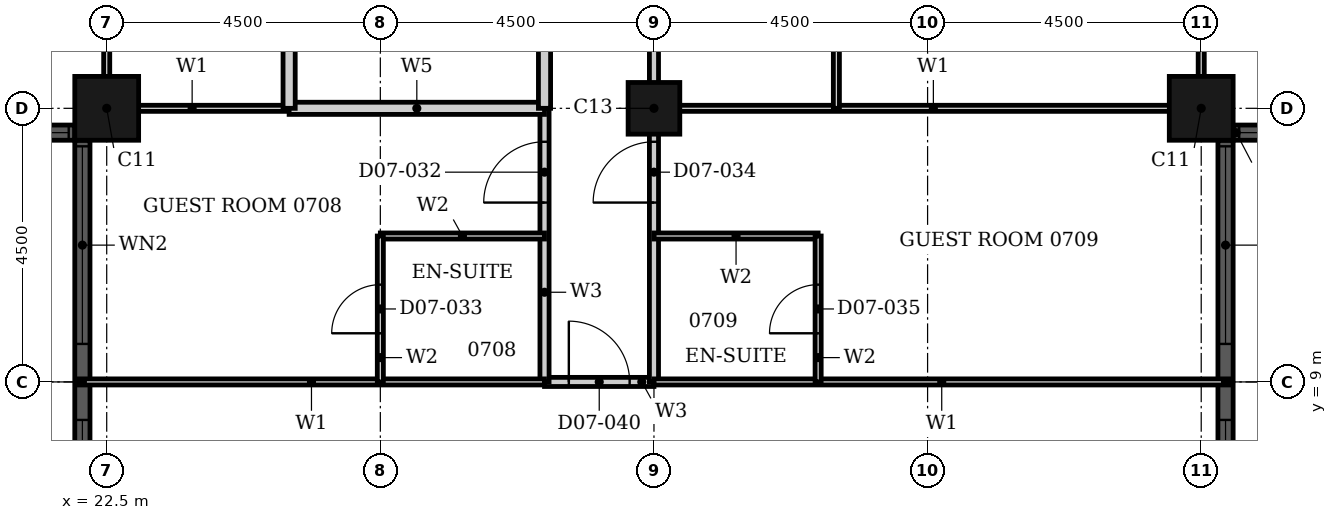
"""IFC4 building model, lengths in metres.
Left out: names, types, materials, properties, quantities, classifications, styles, units other than length and angle.
Written with IfcOpenShell. Run it as: python <this file> out.ifc"""

import sys

from ifc_helpers import new_model, si_unit, direction, frame, frame_2d, origin, origin_2d, place, context, subcontext, project, spatial, rectangle, hollow_rectangle, extrude, element, fill, save


model = new_model("IFC4")
c1 = context("Model", 3, precision=1e-05, world=origin(), true_north=direction((0.0, 1.0)))
c2 = subcontext(c1, "Body", "Model", "MODEL_VIEW")
j1 = project(units=[si_unit("LENGTHUNIT", "METRE"), si_unit("PLANEANGLEUNIT", "RADIAN")], contexts=[c1])
p1 = place(None, origin())
s1 = spatial("IfcSite", under=j1, at=p1, CompositionType="ELEMENT")
p2 = place(p1, origin())
s2 = spatial("IfcBuilding", under=s1, at=p2, CompositionType="ELEMENT")
p3 = place(p2, frame((0.0, 0.0, 37.2)))
s3 = spatial("IfcBuildingStorey", under=s2, at=p3, CompositionType="ELEMENT", Elevation=37.2)
for number, where, z_axis, x_axis in (
    (1, (40.5, 13.5, 0.0), (0.0, 0.0, 1.0), (1.0, 0.0, 0.0)),
    (2, (22.5, 13.5, 0.0), (0.0, 0.0, 1.0), (1.0, 0.0, 0.0)),
):
    element("IfcColumn", number, at=place(p3, frame(where, z_axis=z_axis, x_axis=x_axis)), inside=s3, PredefinedType="COLUMN", context=c2, shape_type="SweptSolid", body=[
        extrude(hollow_rectangle(XDim=1.05, YDim=1.05, WallThickness=0.034, at=origin_2d()), origin(), (0.0, 0.0, 1.0), 3.6),
    ])
p4 = place(p3, frame((31.5, 13.5, 0.0), z_axis=(0.0, 0.0, 1.0), x_axis=(1.0, 0.0, 0.0)))
e3 = element("IfcColumn", 3, at=p4, inside=s3, PredefinedType="COLUMN", context=c2, shape_type="SweptSolid", body=[
    extrude(hollow_rectangle(XDim=0.85, YDim=0.85, WallThickness=0.026, at=origin_2d()), origin(), (0.0, 0.0, 1.0), 3.6),
])
p5 = place(p3, frame((40.9, 5.025, 0.0), z_axis=(0.0, 0.0, 1.0), x_axis=(0.0, 1.0, 0.0)))
e4 = element("IfcWall", 4, at=p5, inside=s3, PredefinedType="SOLIDWALL", context=c2, shape_type="SweptSolid", body=[
    extrude(rectangle(XDim=7.95, YDim=0.25, at=frame_2d((3.975, 0.0))), origin(), (0.0, 0.0, 1.0), 3.6),
])
p6 = place(p5, frame((0.1, 0.0, 0.9)))
e5 = element("IfcOpeningElement", 5, at=p6, cuts=e4, PredefinedType="OPENING", context=c2, shape_type="SweptSolid", body=[
    extrude(rectangle(XDim=3.25, YDim=2.08, at=frame_2d((1.625, 1.04))), frame((0.0, 0.135, 0.0), z_axis=(0.0, -1.0, 0.0), x_axis=(1.0, 0.0, 0.0)), (0.0, 0.0, 1.0), 0.27),
])
p7 = place(p5, frame((4.6, 0.0, 0.9)))
e6 = element("IfcOpeningElement", 6, at=p7, cuts=e4, PredefinedType="OPENING", context=c2, shape_type="SweptSolid", body=[
    extrude(rectangle(XDim=3.25, YDim=2.08, at=frame_2d((1.625, 1.04))), frame((0.0, 0.135, 0.0), z_axis=(0.0, -1.0, 0.0), x_axis=(1.0, 0.0, 0.0)), (0.0, 0.0, 1.0), 0.27),
])
p8 = place(p3, frame((41.025, 13.1, 0.0), z_axis=(0.0, 0.0, 1.0), x_axis=(1.0, 0.0, 0.0)))
e7 = element("IfcWall", 7, at=p8, inside=s3, PredefinedType="SOLIDWALL", context=c2, shape_type="SweptSolid", body=[
    extrude(rectangle(XDim=3.45, YDim=0.25, at=frame_2d((1.725, 0.0))), origin(), (0.0, 0.0, 1.0), 3.6),
])
p9 = place(p8, frame((0.1, 0.0, 0.9)))
e8 = element("IfcOpeningElement", 8, at=p9, cuts=e7, PredefinedType="OPENING", context=c2, shape_type="SweptSolid", body=[
    extrude(rectangle(XDim=3.25, YDim=2.08, at=frame_2d((1.625, 1.04))), frame((0.0, 0.135, 0.0), z_axis=(0.0, -1.0, 0.0), x_axis=(1.0, 0.0, 0.0)), (0.0, 0.0, 1.0), 0.27),
])
p10 = place(p3, frame((18.525, 13.1, 0.0), z_axis=(0.0, 0.0, 1.0), x_axis=(1.0, 0.0, 0.0)))
e9 = element("IfcWall", 9, at=p10, inside=s3, PredefinedType="SOLIDWALL", context=c2, shape_type="SweptSolid", body=[
    extrude(rectangle(XDim=3.45, YDim=0.25, at=frame_2d((1.725, 0.0))), origin(), (0.0, 0.0, 1.0), 3.6),
])
p11 = place(p10, frame((0.1, 0.0, 0.9)))
e10 = element("IfcOpeningElement", 10, at=p11, cuts=e9, PredefinedType="OPENING", context=c2, shape_type="SweptSolid", body=[
    extrude(rectangle(XDim=3.25, YDim=2.08, at=frame_2d((1.625, 1.04))), frame((0.0, 0.135, 0.0), z_axis=(0.0, -1.0, 0.0), x_axis=(1.0, 0.0, 0.0)), (0.0, 0.0, 1.0), 0.27),
])
p12 = place(p3, frame((22.1, 12.975, 0.0), z_axis=(0.0, 0.0, 1.0), x_axis=(0.0, -1.0, 0.0)))
e11 = element("IfcWall", 11, at=p12, inside=s3, PredefinedType="SOLIDWALL", context=c2, shape_type="SweptSolid", body=[
    extrude(rectangle(XDim=7.95, YDim=0.25, at=frame_2d((3.975, 0.0))), origin(), (0.0, 0.0, 1.0), 3.6),
])
p13 = place(p12, frame((0.1, 0.0, 0.9)))
e12 = element("IfcOpeningElement", 12, at=p13, cuts=e11, PredefinedType="OPENING", context=c2, shape_type="SweptSolid", body=[
    extrude(rectangle(XDim=3.25, YDim=2.08, at=frame_2d((1.625, 1.04))), frame((0.0, 0.135, 0.0), z_axis=(0.0, -1.0, 0.0), x_axis=(1.0, 0.0, 0.0)), (0.0, 0.0, 1.0), 0.27),
])
p14 = place(p12, frame((4.6, 0.0, 0.9)))
e13 = element("IfcOpeningElement", 13, at=p14, cuts=e11, PredefinedType="OPENING", context=c2, shape_type="SweptSolid", body=[
    extrude(rectangle(XDim=3.25, YDim=2.08, at=frame_2d((1.625, 1.04))), frame((0.0, 0.135, 0.0), z_axis=(0.0, -1.0, 0.0), x_axis=(1.0, 0.0, 0.0)), (0.0, 0.0, 1.0), 0.27),
])
p15 = place(p3, frame((29.7, 9.0, 0.0), z_axis=(0.0, 0.0, 1.0), x_axis=(1.0, 0.0, 0.0)))
e14 = element("IfcWall", 14, at=p15, inside=s3, PredefinedType="PARTITIONING", context=c2, shape_type="SweptSolid", body=[
    extrude(rectangle(XDim=1.8, YDim=0.15, at=frame_2d((0.9, 0.0))), origin(), (0.0, 0.0, 1.0), 3.3),
])
p16 = place(p15, frame((0.4, 0.0, 0.0)))
e15 = element("IfcOpeningElement", 15, at=p16, cuts=e14, PredefinedType="OPENING", context=c2, shape_type="SweptSolid", body=[
    extrude(rectangle(XDim=1.0, YDim=2.1, at=frame_2d((0.5, 1.05))), frame((0.0, 0.085, 0.0), z_axis=(0.0, -1.0, 0.0), x_axis=(1.0, 0.0, 0.0)), (0.0, 0.0, 1.0), 0.17),
])
p17 = place(p3, frame((29.7, 9.0, 0.0), z_axis=(0.0, 0.0, 1.0), x_axis=(0.0, 1.0, 0.0)))
e16 = element("IfcWall", 16, at=p17, inside=s3, PredefinedType="PARTITIONING", context=c2, shape_type="SweptSolid", body=[
    extrude(rectangle(XDim=4.5, YDim=0.15, at=frame_2d((2.25, 0.0))), origin(), (0.0, 0.0, 1.0), 3.3),
])
p18 = place(p17, frame((2.95, 0.0, 0.0)))
e17 = element("IfcOpeningElement", 17, at=p18, cuts=e16, PredefinedType="OPENING", context=c2, shape_type="SweptSolid", body=[
    extrude(rectangle(XDim=1.0, YDim=2.1, at=frame_2d((0.5, 1.05))), frame((0.0, 0.085, 0.0), z_axis=(0.0, -1.0, 0.0), x_axis=(1.0, 0.0, 0.0)), (0.0, 0.0, 1.0), 0.17),
])
p19 = place(p3, frame((31.5, 9.0, 0.0), z_axis=(0.0, 0.0, 1.0), x_axis=(0.0, 1.0, 0.0)))
e18 = element("IfcWall", 18, at=p19, inside=s3, PredefinedType="PARTITIONING", context=c2, shape_type="SweptSolid", body=[
    extrude(rectangle(XDim=11.7, YDim=0.15, at=frame_2d((5.85, 0.0))), origin(), (0.0, 0.0, 1.0), 2.58),
])
p20 = place(p19, frame((2.95, 0.0, 0.0)))
e19 = element("IfcOpeningElement", 19, at=p20, cuts=e18, PredefinedType="OPENING", context=c2, shape_type="SweptSolid", body=[
    extrude(rectangle(XDim=1.0, YDim=2.1, at=frame_2d((0.5, 1.05))), frame((0.0, 0.085, 0.0), z_axis=(0.0, -1.0, 0.0), x_axis=(1.0, 0.0, 0.0)), (0.0, 0.0, 1.0), 0.17),
])
p21 = place(p3, frame((31.5, 13.5, 0.0), z_axis=(0.0, 0.0, 1.0), x_axis=(1.0, 0.0, 0.0)))
e20 = element("IfcWall", 20, at=p21, inside=s3, PredefinedType="PARTITIONING", context=c2, shape_type="SweptSolid", body=[
    extrude(rectangle(XDim=9.19, YDim=0.1, at=frame_2d((4.595, 0.0))), origin(), (0.0, 0.0, 1.0), 2.38),
])
p22 = place(p3, frame((22.31, 13.5, 0.0), z_axis=(0.0, 0.0, 1.0), x_axis=(1.0, 0.0, 0.0)))
e21 = element("IfcWall", 21, at=p22, inside=s3, PredefinedType="PARTITIONING", context=c2, shape_type="SweptSolid", body=[
    extrude(rectangle(XDim=3.19, YDim=0.1, at=frame_2d((1.595, 0.0))), origin(), (0.0, 0.0, 1.0), 2.38),
])
p23 = place(p3, frame((31.5, 9.0, 0.0), z_axis=(0.0, 0.0, 1.0), x_axis=(1.0, 0.0, 0.0)))
e22 = element("IfcWall", 22, at=p23, inside=s3, PredefinedType="PARTITIONING", context=c2, shape_type="SweptSolid", body=[
    extrude(rectangle(XDim=9.465, YDim=0.1, at=frame_2d((4.732, 0.0))), origin(), (0.0, 0.0, 1.0), 3.3),
])
p24 = place(p3, frame((22.035, 9.0, 0.0), z_axis=(0.0, 0.0, 1.0), x_axis=(1.0, 0.0, 0.0)))
e23 = element("IfcWall", 23, at=p24, inside=s3, PredefinedType="PARTITIONING", context=c2, shape_type="SweptSolid", body=[
    extrude(rectangle(XDim=7.665, YDim=0.1, at=frame_2d((3.833, 0.0))), origin(), (0.0, 0.0, 1.0), 3.3),
])
p25 = place(p3, frame((22.5, 13.31, 0.0), z_axis=(0.0, 0.0, 1.0), x_axis=(0.0, 1.0, 0.0)))
e24 = element("IfcWall", 24, at=p25, inside=s3, PredefinedType="PARTITIONING", context=c2, shape_type="SweptSolid", body=[
    extrude(rectangle(XDim=7.39, YDim=0.1, at=frame_2d((3.695, 0.0))), origin(), (0.0, 0.0, 1.0), 3.3),
])
p26 = place(p3, frame((34.5, 13.5, 0.0), z_axis=(0.0, 0.0, 1.0), x_axis=(0.0, 1.0, 0.0)))
e25 = element("IfcWall", 25, at=p26, inside=s3, PredefinedType="PARTITIONING", context=c2, shape_type="SweptSolid", body=[
    extrude(rectangle(XDim=7.2, YDim=0.1, at=frame_2d((3.6, 0.0))), origin(), (0.0, 0.0, 1.0), 3.3),
])
p27 = place(p3, frame((40.5, 13.31, 0.0), z_axis=(0.0, 0.0, 1.0), x_axis=(0.0, 1.0, 0.0)))
e26 = element("IfcWall", 26, at=p27, inside=s3, PredefinedType="PARTITIONING", context=c2, shape_type="SweptSolid", body=[
    extrude(rectangle(XDim=7.39, YDim=0.1, at=frame_2d((3.695, 0.0))), origin(), (0.0, 0.0, 1.0), 3.3),
])
for number, where, z_axis, x_axis in (
    (27, (31.5, 11.4, 0.0), (0.0, 0.0, 1.0), (1.0, 0.0, 0.0)),
    (28, (27.0, 11.4, 0.0), (0.0, 0.0, 1.0), (1.0, 0.0, 0.0)),
):
    element("IfcWall", number, at=place(p3, frame(where, z_axis=z_axis, x_axis=x_axis)), inside=s3, PredefinedType="PARTITIONING", context=c2, shape_type="SweptSolid", body=[
        extrude(rectangle(XDim=2.7, YDim=0.1, at=frame_2d((1.35, 0.0))), origin(), (0.0, 0.0, 1.0), 3.3),
    ])
p28 = place(p3, frame((27.0, 9.0, 0.0), z_axis=(0.0, 0.0, 1.0), x_axis=(0.0, 1.0, 0.0)))
e29 = element("IfcWall", 29, at=p28, inside=s3, PredefinedType="PARTITIONING", context=c2, shape_type="SweptSolid", body=[
    extrude(rectangle(XDim=2.4, YDim=0.1, at=frame_2d((1.2, 0.0))), origin(), (0.0, 0.0, 1.0), 2.58),
])
p29 = place(p28, frame((0.8, 0.0, 0.0)))
e30 = element("IfcOpeningElement", 30, at=p29, cuts=e29, PredefinedType="OPENING", context=c2, shape_type="SweptSolid", body=[
    extrude(rectangle(XDim=0.8, YDim=2.1, at=frame_2d((0.4, 1.05))), frame((0.0, 0.06, 0.0), z_axis=(0.0, -1.0, 0.0), x_axis=(1.0, 0.0, 0.0)), (0.0, 0.0, 1.0), 0.12),
])
p30 = place(p3, frame((34.2, 9.0, 0.0), z_axis=(0.0, 0.0, 1.0), x_axis=(0.0, 1.0, 0.0)))
e31 = element("IfcWall", 31, at=p30, inside=s3, PredefinedType="PARTITIONING", context=c2, shape_type="SweptSolid", body=[
    extrude(rectangle(XDim=2.4, YDim=0.1, at=frame_2d((1.2, 0.0))), origin(), (0.0, 0.0, 1.0), 3.3),
])
p31 = place(p30, frame((0.8, 0.0, 0.0)))
e32 = element("IfcOpeningElement", 32, at=p31, cuts=e31, PredefinedType="OPENING", context=c2, shape_type="SweptSolid", body=[
    extrude(rectangle(XDim=0.8, YDim=2.1, at=frame_2d((0.4, 1.05))), frame((0.0, 0.06, 0.0), z_axis=(0.0, -1.0, 0.0), x_axis=(1.0, 0.0, 0.0)), (0.0, 0.0, 1.0), 0.12),
])
p32 = place(p3, frame((25.5, 13.5, 0.0), z_axis=(0.0, 0.0, 1.0), x_axis=(1.0, 0.0, 0.0)))
e33 = element("IfcWall", 33, at=p32, inside=s3, PredefinedType="PARTITIONING", context=c2, shape_type="SweptSolid", body=[
    extrude(rectangle(XDim=4.2, YDim=0.2, at=frame_2d((2.1, 0.0))), origin(), (0.0, 0.0, 1.0), 2.38),
])
for number, where, z_axis, x_axis in (
    (34, (25.5, 13.5, 0.0), (0.0, 0.0, 1.0), (0.0, 1.0, 0.0)),
    (35, (29.7, 13.5, 0.0), (0.0, 0.0, 1.0), (0.0, 1.0, 0.0)),
):
    element("IfcWall", number, at=place(p3, frame(where, z_axis=z_axis, x_axis=x_axis)), inside=s3, PredefinedType="PARTITIONING", context=c2, shape_type="SweptSolid", body=[
        extrude(rectangle(XDim=7.2, YDim=0.2, at=frame_2d((3.6, 0.0))), origin(), (0.0, 0.0, 1.0), 3.3),
    ])
p33 = place(p6, origin())
e36 = element("IfcWindow", 36, at=p33, inside=s3, PartitioningType="SINGLE_PANEL", PredefinedType="WINDOW", context=c2, shape_type="SweptSolid", body=[
    extrude(rectangle(XDim=3.25, YDim=2.08, at=frame_2d((1.625, 1.04))), frame((0.0, 0.03, 0.0), z_axis=(0.0, -1.0, 0.0), x_axis=(1.0, 0.0, 0.0)), (0.0, 0.0, 1.0), 0.06),
])
fill(e5, e36)
p34 = place(p7, origin())
e37 = element("IfcWindow", 37, at=p34, inside=s3, PartitioningType="SINGLE_PANEL", PredefinedType="WINDOW", context=c2, shape_type="SweptSolid", body=[
    extrude(rectangle(XDim=3.25, YDim=2.08, at=frame_2d((1.625, 1.04))), frame((0.0, 0.03, 0.0), z_axis=(0.0, -1.0, 0.0), x_axis=(1.0, 0.0, 0.0)), (0.0, 0.0, 1.0), 0.06),
])
fill(e6, e37)
p35 = place(p9, origin())
e38 = element("IfcWindow", 38, at=p35, inside=s3, PartitioningType="SINGLE_PANEL", PredefinedType="WINDOW", context=c2, shape_type="SweptSolid", body=[
    extrude(rectangle(XDim=3.25, YDim=2.08, at=frame_2d((1.625, 1.04))), frame((0.0, 0.03, 0.0), z_axis=(0.0, -1.0, 0.0), x_axis=(1.0, 0.0, 0.0)), (0.0, 0.0, 1.0), 0.06),
])
fill(e8, e38)
p36 = place(p11, origin())
e39 = element("IfcWindow", 39, at=p36, inside=s3, PartitioningType="SINGLE_PANEL", PredefinedType="WINDOW", context=c2, shape_type="SweptSolid", body=[
    extrude(rectangle(XDim=3.25, YDim=2.08, at=frame_2d((1.625, 1.04))), frame((0.0, 0.03, 0.0), z_axis=(0.0, -1.0, 0.0), x_axis=(1.0, 0.0, 0.0)), (0.0, 0.0, 1.0), 0.06),
])
fill(e10, e39)
p37 = place(p13, origin())
e40 = element("IfcWindow", 40, at=p37, inside=s3, PartitioningType="SINGLE_PANEL", PredefinedType="WINDOW", context=c2, shape_type="SweptSolid", body=[
    extrude(rectangle(XDim=3.25, YDim=2.08, at=frame_2d((1.625, 1.04))), frame((0.0, 0.03, 0.0), z_axis=(0.0, -1.0, 0.0), x_axis=(1.0, 0.0, 0.0)), (0.0, 0.0, 1.0), 0.06),
])
fill(e12, e40)
p38 = place(p14, origin())
e41 = element("IfcWindow", 41, at=p38, inside=s3, PartitioningType="SINGLE_PANEL", PredefinedType="WINDOW", context=c2, shape_type="SweptSolid", body=[
    extrude(rectangle(XDim=3.25, YDim=2.08, at=frame_2d((1.625, 1.04))), frame((0.0, 0.03, 0.0), z_axis=(0.0, -1.0, 0.0), x_axis=(1.0, 0.0, 0.0)), (0.0, 0.0, 1.0), 0.06),
])
fill(e13, e41)
p39 = place(p18, origin())
e42 = element("IfcDoor", 42, at=p39, inside=s3, OperationType="SINGLE_SWING_RIGHT", PredefinedType="DOOR", context=c2, shape_type="SweptSolid", body=[
    extrude(rectangle(XDim=1.0, YDim=2.1, at=frame_2d((0.5, 1.05))), frame((0.0, 0.025, 0.0), z_axis=(0.0, -1.0, 0.0), x_axis=(1.0, 0.0, 0.0)), (0.0, 0.0, 1.0), 0.05),
])
fill(e17, e42)
p40 = place(p29, origin())
e43 = element("IfcDoor", 43, at=p40, inside=s3, OperationType="SINGLE_SWING_RIGHT", PredefinedType="DOOR", context=c2, shape_type="SweptSolid", body=[
    extrude(rectangle(XDim=0.8, YDim=2.1, at=frame_2d((0.4, 1.05))), frame((0.0, 0.025, 0.0), z_axis=(0.0, -1.0, 0.0), x_axis=(1.0, 0.0, 0.0)), (0.0, 0.0, 1.0), 0.05),
])
fill(e30, e43)
p41 = place(p20, origin())
e44 = element("IfcDoor", 44, at=p41, inside=s3, OperationType="SINGLE_SWING_RIGHT", PredefinedType="DOOR", context=c2, shape_type="SweptSolid", body=[
    extrude(rectangle(XDim=1.0, YDim=2.1, at=frame_2d((0.5, 1.05))), frame((0.0, 0.025, 0.0), z_axis=(0.0, -1.0, 0.0), x_axis=(1.0, 0.0, 0.0)), (0.0, 0.0, 1.0), 0.05),
])
fill(e19, e44)
p42 = place(p31, origin())
e45 = element("IfcDoor", 45, at=p42, inside=s3, OperationType="SINGLE_SWING_RIGHT", PredefinedType="DOOR", context=c2, shape_type="SweptSolid", body=[
    extrude(rectangle(XDim=0.8, YDim=2.1, at=frame_2d((0.4, 1.05))), frame((0.0, 0.025, 0.0), z_axis=(0.0, -1.0, 0.0), x_axis=(1.0, 0.0, 0.0)), (0.0, 0.0, 1.0), 0.05),
])
fill(e32, e45)
p43 = place(p16, origin())
e46 = element("IfcDoor", 46, at=p43, inside=s3, OperationType="SINGLE_SWING_LEFT", PredefinedType="DOOR", context=c2, shape_type="SweptSolid", body=[
    extrude(rectangle(XDim=1.0, YDim=2.1, at=frame_2d((0.5, 1.05))), frame((0.0, 0.025, 0.0), z_axis=(0.0, -1.0, 0.0), x_axis=(1.0, 0.0, 0.0)), (0.0, 0.0, 1.0), 0.05),
])
fill(e15, e46)
save(model, sys.argv[1])
